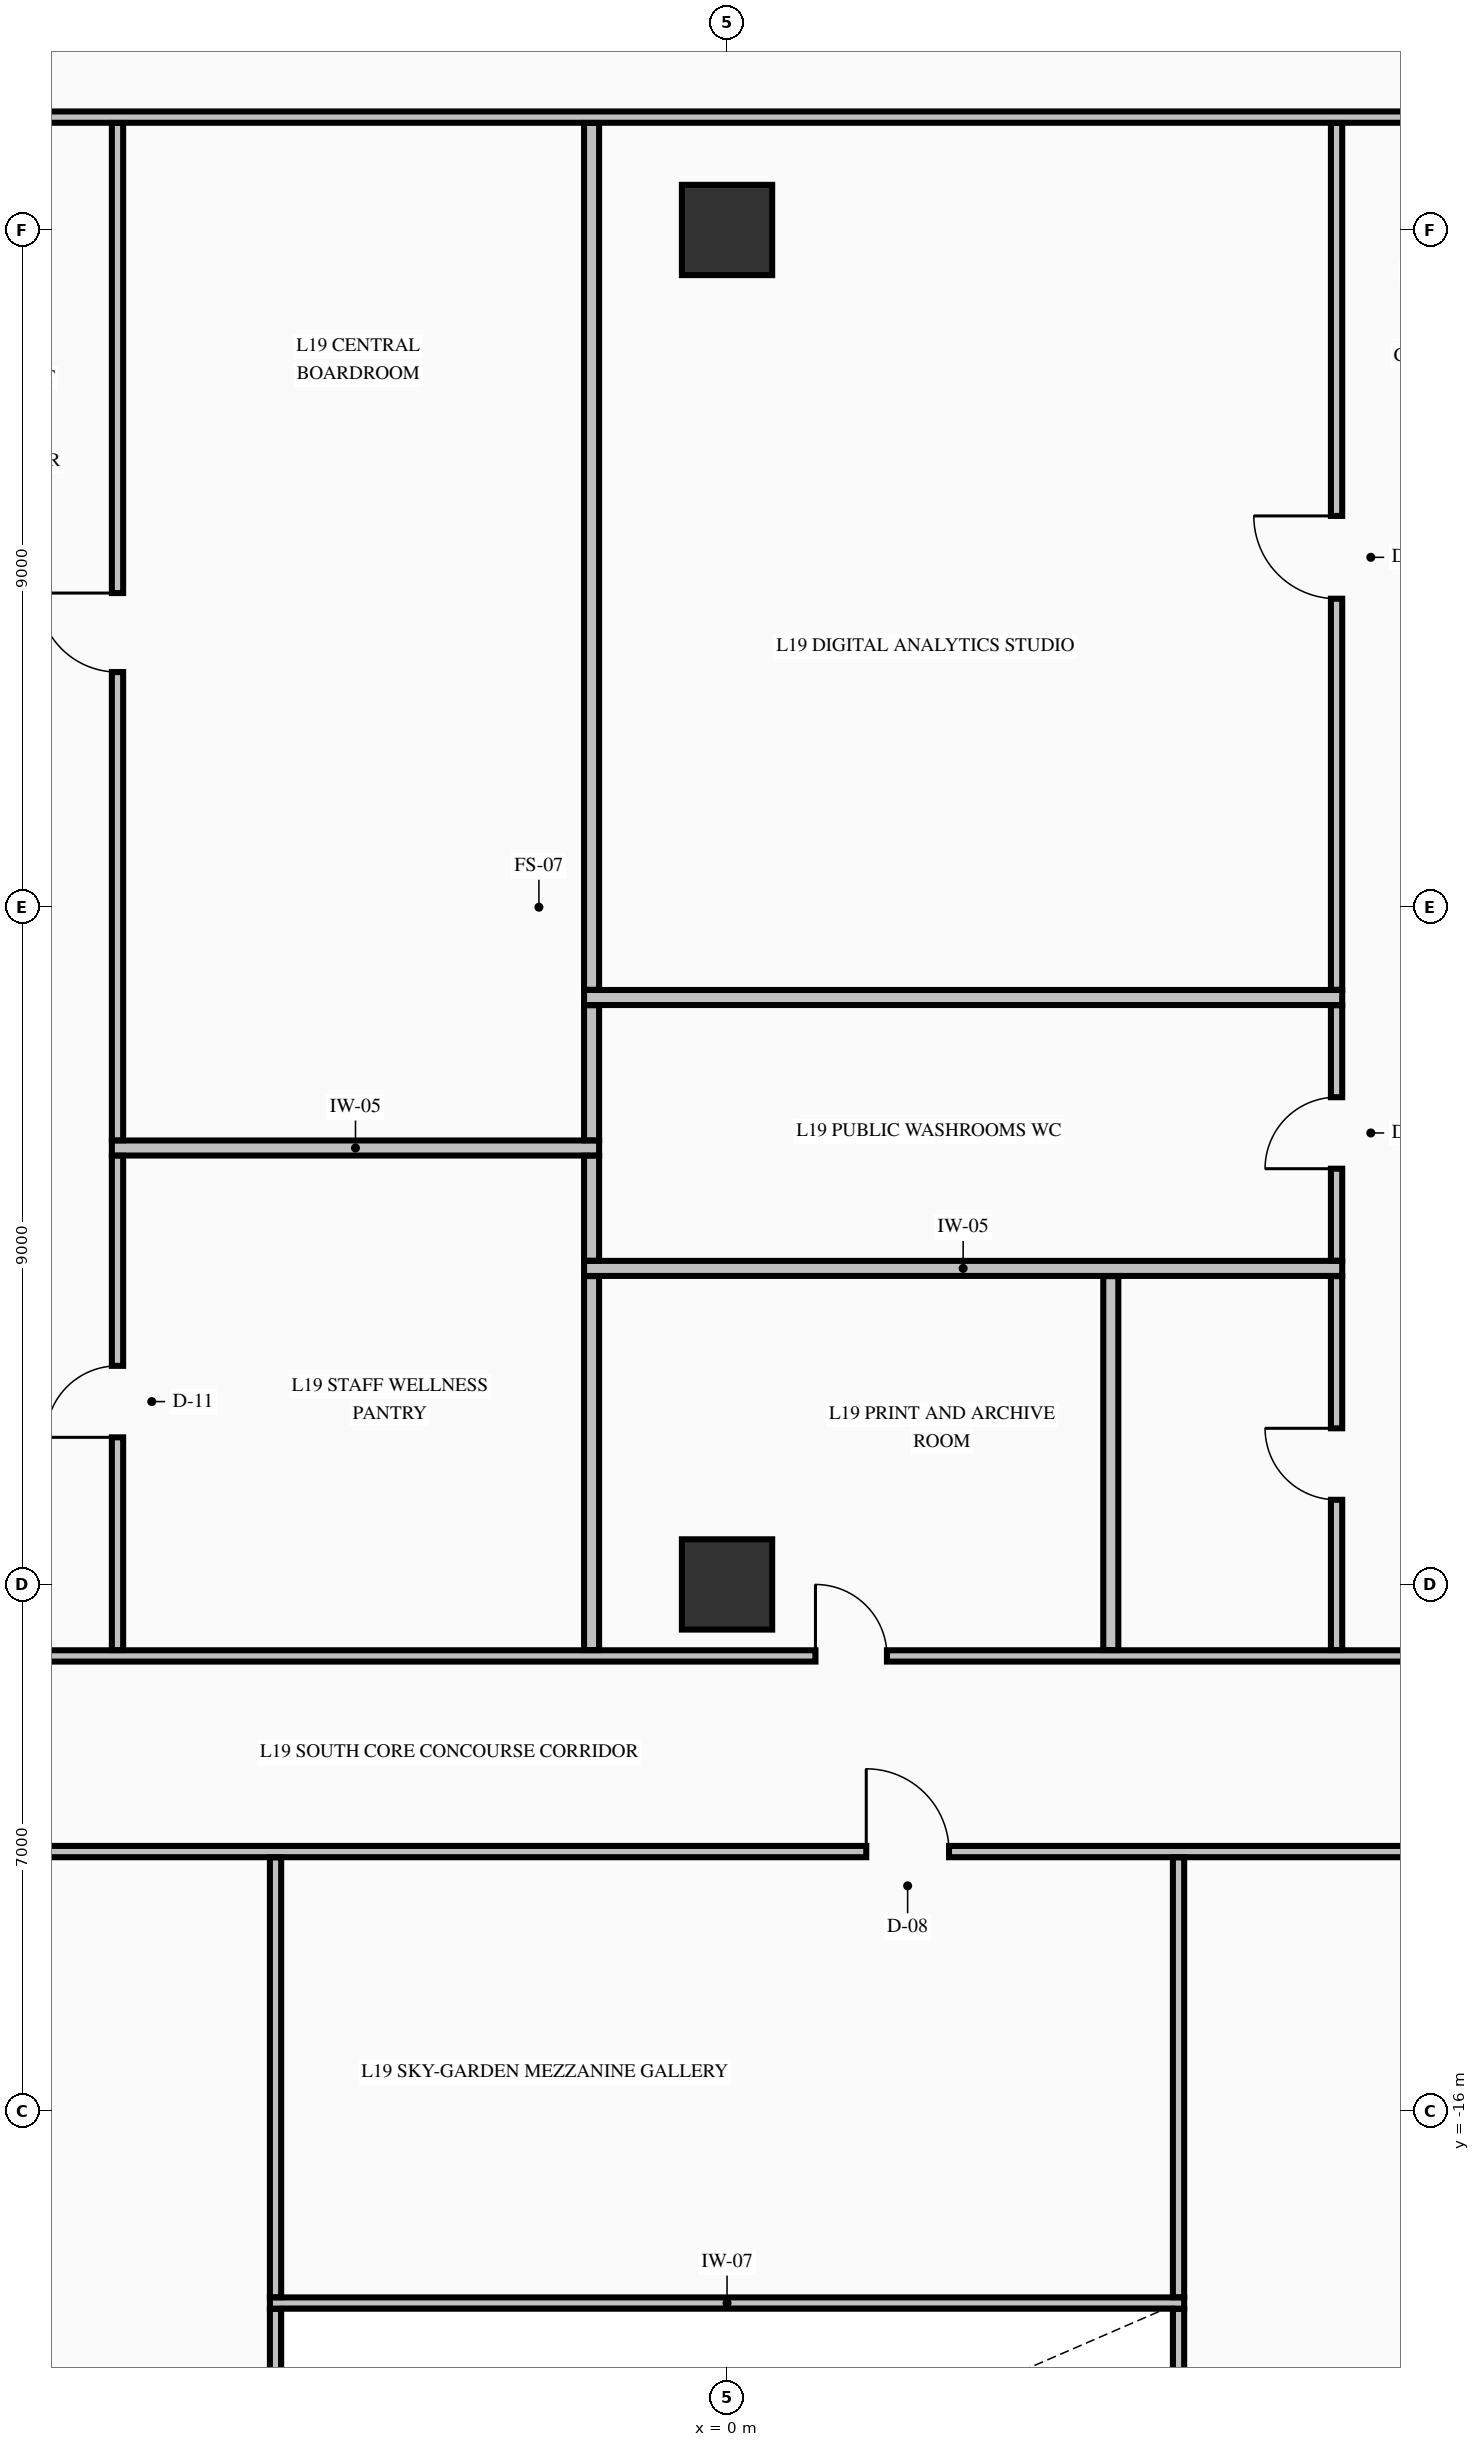
"""IFC4 building model, lengths in metres.
Left out: names, types, materials, properties, quantities, classifications, styles, units other than length and angle.
Written with IfcOpenShell. Run it as: python <this file> out.ifc"""

import sys

from ifc_helpers import new_model, si_unit, direction, frame, frame_2d, origin, origin_2d, place, context, subcontext, project, spatial, rectangle, extrude, element, fill, save


model = new_model("IFC4")
c1 = context("Model", 3, precision=1e-05, world=origin(), true_north=direction((0.0, 1.0)))
c2 = subcontext(c1, "Body", "Model", "MODEL_VIEW")
j1 = project(units=[si_unit("LENGTHUNIT", "METRE"), si_unit("PLANEANGLEUNIT", "RADIAN")], contexts=[c1])
p1 = place(None, origin())
s1 = spatial("IfcSite", under=j1, at=p1, CompositionType="ELEMENT")
p2 = place(p1, origin())
s2 = spatial("IfcBuilding", under=s1, at=p2, CompositionType="ELEMENT")
p3 = place(p2, frame((0.0, 0.0, 78.61)))
s3 = spatial("IfcBuildingStorey", under=s2, at=p3, CompositionType="ELEMENT", Elevation=78.61)
for number, where, z_axis, x_axis in (
    (1, (0.0, -9.0, -0.25), (0.0, 0.0, 1.0), (1.0, 0.0, 0.0)),
    (2, (0.0, 9.0, -0.25), (0.0, 0.0, 1.0), (1.0, 0.0, 0.0)),
):
    element("IfcColumn", number, at=place(p3, frame(where, z_axis=z_axis, x_axis=x_axis)), inside=s3, PredefinedType="COLUMN", context=c2, shape_type="SweptSolid", body=[
        extrude(rectangle(XDim=1.2, YDim=1.2, at=origin_2d()), origin(), (0.0, 0.0, 1.0), 3.395),
    ])
p4 = place(p3, frame((-6.075, -18.55, 0.0), z_axis=(0.0, 0.0, 1.0), x_axis=(1.0, 0.0, 0.0)))
e3 = element("IfcWall", 3, at=p4, inside=s3, PredefinedType="PARTITIONING", context=c2, shape_type="SweptSolid", body=[
    extrude(rectangle(XDim=12.15, YDim=0.15, at=frame_2d((6.075, 0.0))), origin(), (0.0, 0.0, 1.0), 3.145),
])
p5 = place(p3, frame((-28.835, -12.55, 0.0), z_axis=(0.0, 0.0, 1.0), x_axis=(1.0, 0.0, 0.0)))
e4 = element("IfcWall", 4, at=p5, inside=s3, PredefinedType="PARTITIONING", context=c2, shape_type="SweptSolid", body=[
    extrude(rectangle(XDim=52.67, YDim=0.15, at=frame_2d((26.335, 0.0))), origin(), (0.0, 0.0, 1.0), 3.145),
])
p6 = place(p5, frame((30.685, 0.0, 0.0)))
e5 = element("IfcOpeningElement", 5, at=p6, cuts=e4, PredefinedType="OPENING", context=c2, shape_type="SweptSolid", body=[
    extrude(rectangle(XDim=1.1, YDim=2.15, at=frame_2d((0.55, 1.075))), frame((0.0, 0.085, 0.0), z_axis=(0.0, -1.0, 0.0), x_axis=(1.0, 0.0, 0.0)), (0.0, 0.0, 1.0), 0.17),
])
p7 = place(p5, frame((15.41, 0.0, 0.0)))
e6 = element("IfcOpeningElement", 6, at=p7, cuts=e4, PredefinedType="OPENING", context=c2, shape_type="SweptSolid", body=[
    extrude(rectangle(XDim=1.05, YDim=2.15, at=frame_2d((0.525, 1.075))), frame((0.0, 0.085, 0.0), z_axis=(0.0, -1.0, 0.0), x_axis=(1.0, 0.0, 0.0)), (0.0, 0.0, 1.0), 0.17),
])
p8 = place(p5, frame((41.21, 0.0, 0.0)))
e7 = element("IfcOpeningElement", 7, at=p8, cuts=e4, PredefinedType="OPENING", context=c2, shape_type="SweptSolid", body=[
    extrude(rectangle(XDim=1.05, YDim=2.15, at=frame_2d((0.525, 1.075))), frame((0.0, 0.085, 0.0), z_axis=(0.0, -1.0, 0.0), x_axis=(1.0, 0.0, 0.0)), (0.0, 0.0, 1.0), 0.17),
])
p9 = place(p3, frame((-10.394, -9.95, 0.0), z_axis=(0.0, 0.0, 1.0), x_axis=(1.0, 0.0, 0.0)))
e8 = element("IfcWall", 8, at=p9, inside=s3, PredefinedType="PARTITIONING", context=c2, shape_type="SweptSolid", body=[
    extrude(rectangle(XDim=20.788, YDim=0.15, at=frame_2d((10.394, 0.0))), origin(), (0.0, 0.0, 1.0), 3.145),
])
p10 = place(p9, frame((0.319, 0.0, 0.0)))
e9 = element("IfcOpeningElement", 9, at=p10, cuts=e8, PredefinedType="OPENING", context=c2, shape_type="SweptSolid", body=[
    extrude(rectangle(XDim=1.05, YDim=2.15, at=frame_2d((0.525, 1.075))), frame((0.0, 0.085, 0.0), z_axis=(0.0, -1.0, 0.0), x_axis=(1.0, 0.0, 0.0)), (0.0, 0.0, 1.0), 0.17),
])
p11 = place(p9, frame((19.419, 0.0, 0.0)))
e10 = element("IfcOpeningElement", 10, at=p11, cuts=e8, PredefinedType="OPENING", context=c2, shape_type="SweptSolid", body=[
    extrude(rectangle(XDim=1.05, YDim=2.15, at=frame_2d((0.525, 1.075))), frame((0.0, 0.085, 0.0), z_axis=(0.0, -1.0, 0.0), x_axis=(1.0, 0.0, 0.0)), (0.0, 0.0, 1.0), 0.17),
])
p12 = place(p9, frame((11.569, 0.0, 0.0)))
e11 = element("IfcOpeningElement", 11, at=p12, cuts=e8, PredefinedType="OPENING", context=c2, shape_type="SweptSolid", body=[
    extrude(rectangle(XDim=0.95, YDim=2.15, at=frame_2d((0.475, 1.075))), frame((0.0, 0.085, 0.0), z_axis=(0.0, -1.0, 0.0), x_axis=(1.0, 0.0, 0.0)), (0.0, 0.0, 1.0), 0.17),
])
p13 = place(p3, frame((-1.9, -4.8, 0.0), z_axis=(0.0, 0.0, 1.0), x_axis=(1.0, 0.0, 0.0)))
e12 = element("IfcWall", 12, at=p13, inside=s3, PredefinedType="PARTITIONING", context=c2, shape_type="SweptSolid", body=[
    extrude(rectangle(XDim=10.075, YDim=0.2, at=frame_2d((5.038, 0.0))), origin(), (0.0, 0.0, 1.0), 3.145),
])
p14 = place(p3, frame((-8.175, -3.2, 0.0), z_axis=(0.0, 0.0, 1.0), x_axis=(1.0, 0.0, 0.0)))
e13 = element("IfcWall", 13, at=p14, inside=s3, PredefinedType="PARTITIONING", context=c2, shape_type="SweptSolid", body=[
    extrude(rectangle(XDim=6.475, YDim=0.2, at=frame_2d((3.238, 0.0))), origin(), (0.0, 0.0, 1.0), 3.145),
])
p15 = place(p3, frame((-1.9, -1.2, 0.0), z_axis=(0.0, 0.0, 1.0), x_axis=(1.0, 0.0, 0.0)))
e14 = element("IfcWall", 14, at=p15, inside=s3, PredefinedType="PARTITIONING", context=c2, shape_type="SweptSolid", body=[
    extrude(rectangle(XDim=10.075, YDim=0.2, at=frame_2d((5.038, 0.0))), origin(), (0.0, 0.0, 1.0), 3.145),
])
p16 = place(p3, frame((-10.394, 10.5, 0.0), z_axis=(0.0, 0.0, 1.0), x_axis=(1.0, 0.0, 0.0)))
e15 = element("IfcWall", 15, at=p16, inside=s3, PredefinedType="PARTITIONING", context=c2, shape_type="SweptSolid", body=[
    extrude(rectangle(XDim=20.788, YDim=0.15, at=frame_2d((10.394, 0.0))), origin(), (0.0, 0.0, 1.0), 3.145),
])
p17 = place(p16, frame((0.319, 0.0, 0.0)))
e16 = element("IfcOpeningElement", 16, at=p17, cuts=e15, PredefinedType="OPENING", context=c2, shape_type="SweptSolid", body=[
    extrude(rectangle(XDim=1.05, YDim=2.15, at=frame_2d((0.525, 1.075))), frame((0.0, 0.085, 0.0), z_axis=(0.0, -1.0, 0.0), x_axis=(1.0, 0.0, 0.0)), (0.0, 0.0, 1.0), 0.17),
])
p18 = place(p16, frame((19.419, 0.0, 0.0)))
e17 = element("IfcOpeningElement", 17, at=p18, cuts=e15, PredefinedType="OPENING", context=c2, shape_type="SweptSolid", body=[
    extrude(rectangle(XDim=1.05, YDim=2.15, at=frame_2d((0.525, 1.075))), frame((0.0, 0.085, 0.0), z_axis=(0.0, -1.0, 0.0), x_axis=(1.0, 0.0, 0.0)), (0.0, 0.0, 1.0), 0.17),
])
p19 = place(p3, frame((-8.1, -9.872, 0.0), z_axis=(0.0, 0.0, 1.0), x_axis=(0.0, 1.0, 0.0)))
e18 = element("IfcWall", 18, at=p19, inside=s3, PredefinedType="PARTITIONING", context=c2, shape_type="SweptSolid", body=[
    extrude(rectangle(XDim=6.569, YDim=0.15, at=frame_2d((3.285, 0.0))), origin(), (0.0, 0.0, 1.0), 3.145),
])
p20 = place(p19, frame((2.827, 0.0, 0.0)))
e19 = element("IfcOpeningElement", 19, at=p20, cuts=e18, PredefinedType="OPENING", context=c2, shape_type="SweptSolid", body=[
    extrude(rectangle(XDim=0.95, YDim=2.15, at=frame_2d((0.475, 1.075))), frame((0.0, 0.085, 0.0), z_axis=(0.0, -1.0, 0.0), x_axis=(1.0, 0.0, 0.0)), (0.0, 0.0, 1.0), 0.17),
])
p21 = place(p3, frame((-8.1, -3.097, 0.0), z_axis=(0.0, 0.0, 1.0), x_axis=(0.0, 1.0, 0.0)))
e20 = element("IfcWall", 20, at=p21, inside=s3, PredefinedType="PARTITIONING", context=c2, shape_type="SweptSolid", body=[
    extrude(rectangle(XDim=13.519, YDim=0.15, at=frame_2d((6.76, 0.0))), origin(), (0.0, 0.0, 1.0), 3.145),
])
p22 = place(p21, frame((6.222, 0.0, 0.0)))
e21 = element("IfcOpeningElement", 21, at=p22, cuts=e20, PredefinedType="OPENING", context=c2, shape_type="SweptSolid", body=[
    extrude(rectangle(XDim=1.05, YDim=2.15, at=frame_2d((0.525, 1.075))), frame((0.0, 0.085, 0.0), z_axis=(0.0, -1.0, 0.0), x_axis=(1.0, 0.0, 0.0)), (0.0, 0.0, 1.0), 0.17),
])
p23 = place(p3, frame((-6.0, -23.672, 0.0), z_axis=(0.0, 0.0, 1.0), x_axis=(0.0, 1.0, 0.0)))
e22 = element("IfcWall", 22, at=p23, inside=s3, PredefinedType="PARTITIONING", context=c2, shape_type="SweptSolid", body=[
    extrude(rectangle(XDim=5.044, YDim=0.15, at=frame_2d((2.522, 0.0))), origin(), (0.0, 0.0, 1.0), 3.145),
])
p24 = place(p3, frame((-6.0, -18.472, 0.0), z_axis=(0.0, 0.0, 1.0), x_axis=(0.0, 1.0, 0.0)))
e23 = element("IfcWall", 23, at=p24, inside=s3, PredefinedType="PARTITIONING", context=c2, shape_type="SweptSolid", body=[
    extrude(rectangle(XDim=5.844, YDim=0.15, at=frame_2d((2.922, 0.0))), origin(), (0.0, 0.0, 1.0), 3.145),
])
p25 = place(p3, frame((-1.8, -9.872, 0.0), z_axis=(0.0, 0.0, 1.0), x_axis=(0.0, 1.0, 0.0)))
e24 = element("IfcWall", 24, at=p25, inside=s3, PredefinedType="PARTITIONING", context=c2, shape_type="SweptSolid", body=[
    extrude(rectangle(XDim=4.969, YDim=0.2, at=frame_2d((2.484, 0.0))), origin(), (0.0, 0.0, 1.0), 3.145),
])
p26 = place(p3, frame((-1.8, -4.697, 0.0), z_axis=(0.0, 0.0, 1.0), x_axis=(0.0, 1.0, 0.0)))
e25 = element("IfcWall", 25, at=p26, inside=s3, PredefinedType="PARTITIONING", context=c2, shape_type="SweptSolid", body=[
    extrude(rectangle(XDim=1.394, YDim=0.2, at=frame_2d((0.697, 0.0))), origin(), (0.0, 0.0, 1.0), 3.145),
])
p27 = place(p3, frame((-1.8, -3.097, 0.0), z_axis=(0.0, 0.0, 1.0), x_axis=(0.0, 1.0, 0.0)))
e26 = element("IfcWall", 26, at=p27, inside=s3, PredefinedType="PARTITIONING", context=c2, shape_type="SweptSolid", body=[
    extrude(rectangle(XDim=1.794, YDim=0.2, at=frame_2d((0.897, 0.0))), origin(), (0.0, 0.0, 1.0), 3.145),
])
p28 = place(p3, frame((-1.8, -1.097, 0.0), z_axis=(0.0, 0.0, 1.0), x_axis=(0.0, 1.0, 0.0)))
e27 = element("IfcWall", 27, at=p28, inside=s3, PredefinedType="PARTITIONING", context=c2, shape_type="SweptSolid", body=[
    extrude(rectangle(XDim=11.519, YDim=0.2, at=frame_2d((5.76, 0.0))), origin(), (0.0, 0.0, 1.0), 3.145),
])
p29 = place(p3, frame((5.1, -9.872, 0.0), z_axis=(0.0, 0.0, 1.0), x_axis=(0.0, 1.0, 0.0)))
e28 = element("IfcWall", 28, at=p29, inside=s3, PredefinedType="PARTITIONING", context=c2, shape_type="SweptSolid", body=[
    extrude(rectangle(XDim=4.969, YDim=0.2, at=frame_2d((2.484, 0.0))), origin(), (0.0, 0.0, 1.0), 3.145),
])
p30 = place(p3, frame((6.0, -23.672, 0.0), z_axis=(0.0, 0.0, 1.0), x_axis=(0.0, 1.0, 0.0)))
e29 = element("IfcWall", 29, at=p30, inside=s3, PredefinedType="PARTITIONING", context=c2, shape_type="SweptSolid", body=[
    extrude(rectangle(XDim=5.044, YDim=0.15, at=frame_2d((2.522, 0.0))), origin(), (0.0, 0.0, 1.0), 3.145),
])
p31 = place(p3, frame((6.0, -18.472, 0.0), z_axis=(0.0, 0.0, 1.0), x_axis=(0.0, 1.0, 0.0)))
e30 = element("IfcWall", 30, at=p31, inside=s3, PredefinedType="PARTITIONING", context=c2, shape_type="SweptSolid", body=[
    extrude(rectangle(XDim=5.844, YDim=0.15, at=frame_2d((2.922, 0.0))), origin(), (0.0, 0.0, 1.0), 3.145),
])
p32 = place(p3, frame((8.1, -9.872, 0.0), z_axis=(0.0, 0.0, 1.0), x_axis=(0.0, 1.0, 0.0)))
e31 = element("IfcWall", 31, at=p32, inside=s3, PredefinedType="PARTITIONING", context=c2, shape_type="SweptSolid", body=[
    extrude(rectangle(XDim=4.969, YDim=0.15, at=frame_2d((2.484, 0.0))), origin(), (0.0, 0.0, 1.0), 3.145),
])
p33 = place(p32, frame((1.997, 0.0, 0.0)))
e32 = element("IfcOpeningElement", 32, at=p33, cuts=e31, PredefinedType="OPENING", context=c2, shape_type="SweptSolid", body=[
    extrude(rectangle(XDim=0.95, YDim=2.15, at=frame_2d((0.475, 1.075))), frame((0.0, 0.085, 0.0), z_axis=(0.0, -1.0, 0.0), x_axis=(1.0, 0.0, 0.0)), (0.0, 0.0, 1.0), 0.17),
])
p34 = place(p3, frame((8.1, -4.697, 0.0), z_axis=(0.0, 0.0, 1.0), x_axis=(0.0, 1.0, 0.0)))
e33 = element("IfcWall", 33, at=p34, inside=s3, PredefinedType="PARTITIONING", context=c2, shape_type="SweptSolid", body=[
    extrude(rectangle(XDim=3.394, YDim=0.15, at=frame_2d((1.697, 0.0))), origin(), (0.0, 0.0, 1.0), 3.145),
])
p35 = place(p34, frame((1.222, 0.0, 0.0)))
e34 = element("IfcOpeningElement", 34, at=p35, cuts=e33, PredefinedType="OPENING", context=c2, shape_type="SweptSolid", body=[
    extrude(rectangle(XDim=0.95, YDim=2.15, at=frame_2d((0.475, 1.075))), frame((0.0, 0.085, 0.0), z_axis=(0.0, -1.0, 0.0), x_axis=(1.0, 0.0, 0.0)), (0.0, 0.0, 1.0), 0.17),
])
p36 = place(p3, frame((8.1, -1.097, 0.0), z_axis=(0.0, 0.0, 1.0), x_axis=(0.0, 1.0, 0.0)))
e35 = element("IfcWall", 35, at=p36, inside=s3, PredefinedType="PARTITIONING", context=c2, shape_type="SweptSolid", body=[
    extrude(rectangle(XDim=11.519, YDim=0.15, at=frame_2d((5.76, 0.0))), origin(), (0.0, 0.0, 1.0), 3.145),
])
p37 = place(p36, frame((5.197, 0.0, 0.0)))
e36 = element("IfcOpeningElement", 36, at=p37, cuts=e35, PredefinedType="OPENING", context=c2, shape_type="SweptSolid", body=[
    extrude(rectangle(XDim=1.1, YDim=2.15, at=frame_2d((0.55, 1.075))), frame((0.0, 0.085, 0.0), z_axis=(0.0, -1.0, 0.0), x_axis=(1.0, 0.0, 0.0)), (0.0, 0.0, 1.0), 0.17),
])
p38 = place(p6, origin())
e37 = element("IfcDoor", 37, at=p38, inside=s3, OperationType="SINGLE_SWING_LEFT", PredefinedType="DOOR", context=c2, shape_type="SweptSolid", body=[
    extrude(rectangle(XDim=1.1, YDim=2.15, at=frame_2d((0.55, 1.075))), frame((0.0, 0.025, 0.0), z_axis=(0.0, -1.0, 0.0), x_axis=(1.0, 0.0, 0.0)), (0.0, 0.0, 1.0), 0.05),
])
fill(e5, e37)
p39 = place(p22, origin())
e38 = element("IfcDoor", 38, at=p39, inside=s3, OperationType="SINGLE_SWING_RIGHT", PredefinedType="DOOR", context=c2, shape_type="SweptSolid", body=[
    extrude(rectangle(XDim=1.05, YDim=2.15, at=frame_2d((0.525, 1.075))), frame((0.0, 0.025, 0.0), z_axis=(0.0, -1.0, 0.0), x_axis=(1.0, 0.0, 0.0)), (0.0, 0.0, 1.0), 0.05),
])
fill(e21, e38)
p40 = place(p20, origin())
e39 = element("IfcDoor", 39, at=p40, inside=s3, OperationType="SINGLE_SWING_LEFT", PredefinedType="DOOR", context=c2, shape_type="SweptSolid", body=[
    extrude(rectangle(XDim=0.95, YDim=2.15, at=frame_2d((0.475, 1.075))), frame((0.0, 0.025, 0.0), z_axis=(0.0, -1.0, 0.0), x_axis=(1.0, 0.0, 0.0)), (0.0, 0.0, 1.0), 0.05),
])
fill(e19, e39)
p41 = place(p37, origin())
e40 = element("IfcDoor", 40, at=p41, inside=s3, OperationType="SINGLE_SWING_RIGHT", PredefinedType="DOOR", context=c2, shape_type="SweptSolid", body=[
    extrude(rectangle(XDim=1.1, YDim=2.15, at=frame_2d((0.55, 1.075))), frame((0.0, 0.025, 0.0), z_axis=(0.0, -1.0, 0.0), x_axis=(1.0, 0.0, 0.0)), (0.0, 0.0, 1.0), 0.05),
])
fill(e36, e40)
p42 = place(p35, origin())
e41 = element("IfcDoor", 41, at=p42, inside=s3, OperationType="SINGLE_SWING_LEFT", PredefinedType="DOOR", context=c2, shape_type="SweptSolid", body=[
    extrude(rectangle(XDim=0.95, YDim=2.15, at=frame_2d((0.475, 1.075))), frame((0.0, 0.025, 0.0), z_axis=(0.0, -1.0, 0.0), x_axis=(1.0, 0.0, 0.0)), (0.0, 0.0, 1.0), 0.05),
])
fill(e34, e41)
p43 = place(p33, origin())
e42 = element("IfcDoor", 42, at=p43, inside=s3, OperationType="SINGLE_SWING_RIGHT", PredefinedType="DOOR", context=c2, shape_type="SweptSolid", body=[
    extrude(rectangle(XDim=0.95, YDim=2.15, at=frame_2d((0.475, 1.075))), frame((0.0, 0.025, 0.0), z_axis=(0.0, -1.0, 0.0), x_axis=(1.0, 0.0, 0.0)), (0.0, 0.0, 1.0), 0.05),
])
fill(e32, e42)
p44 = place(p12, origin())
e43 = element("IfcDoor", 43, at=p44, inside=s3, OperationType="SINGLE_SWING_LEFT", PredefinedType="DOOR", context=c2, shape_type="SweptSolid", body=[
    extrude(rectangle(XDim=0.95, YDim=2.15, at=frame_2d((0.475, 1.075))), frame((0.0, 0.025, 0.0), z_axis=(0.0, -1.0, 0.0), x_axis=(1.0, 0.0, 0.0)), (0.0, 0.0, 1.0), 0.05),
])
fill(e11, e43)
save(model, sys.argv[1])
